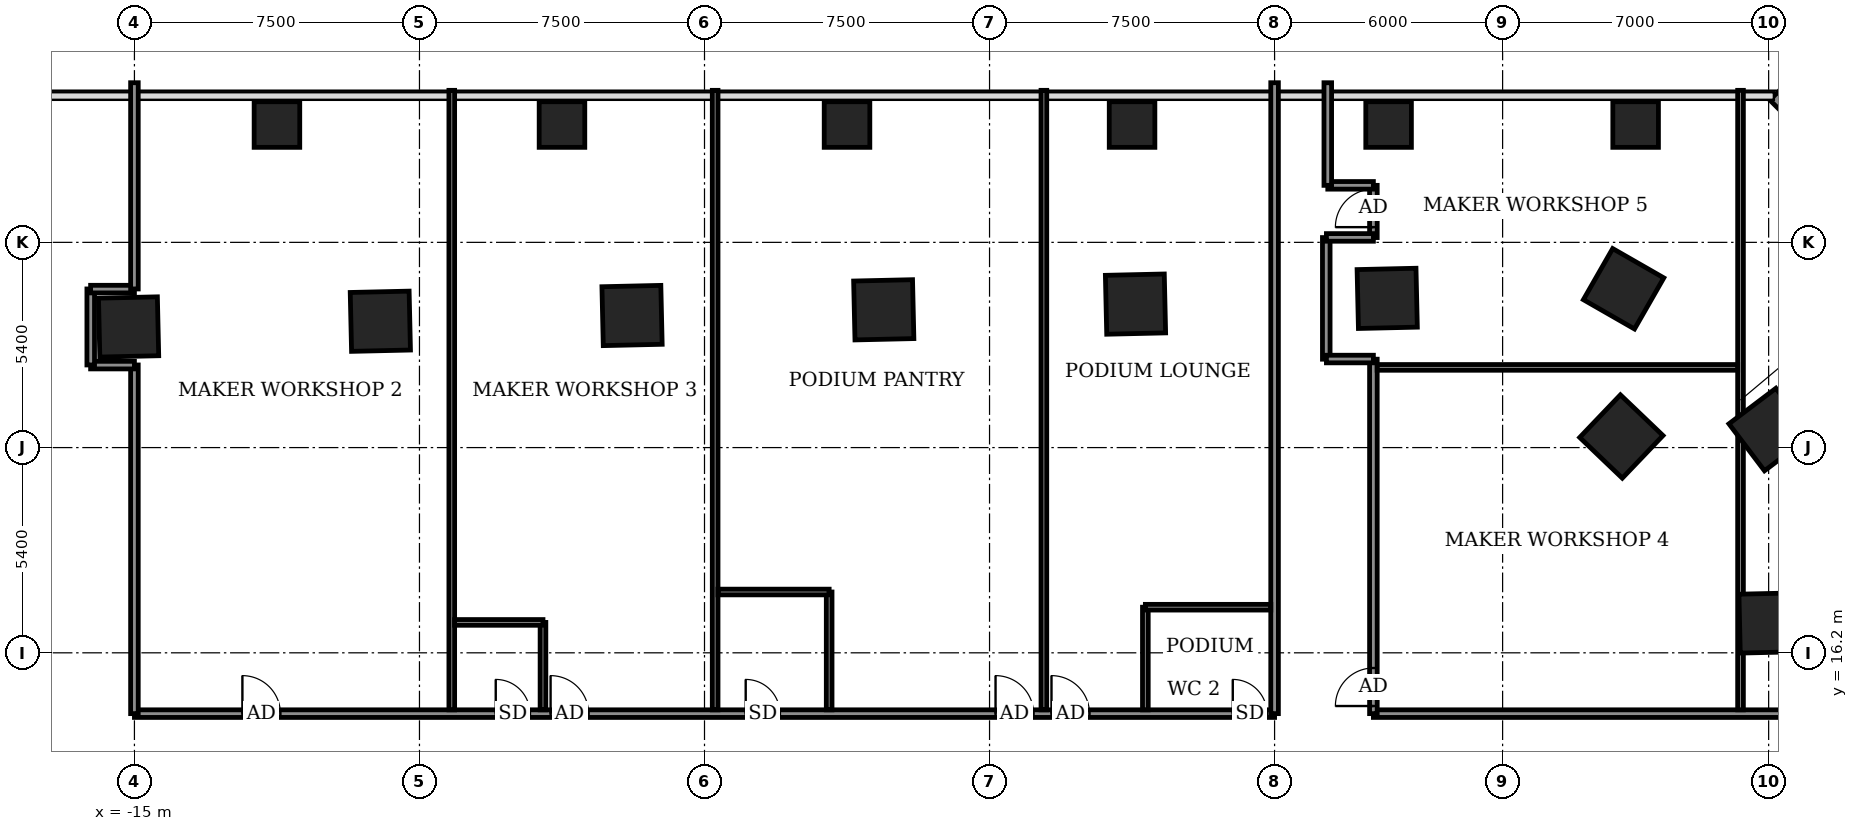
"""IFC4 building model, lengths in metres.
Left out: names, types, materials, properties, quantities, classifications, styles, units other than length and angle.
Written with IfcOpenShell. Run it as: python <this file> out.ifc"""

import sys

from ifc_helpers import new_model, si_unit, direction, frame, frame_2d, origin, origin_2d, place, context, subcontext, project, spatial, rectangle, extrude, element, fill, save


model = new_model("IFC4")
c1 = context("Model", 3, precision=1e-05, world=origin(), true_north=direction((0.0, 1.0)))
c2 = subcontext(c1, "Body", "Model", "MODEL_VIEW")
j1 = project(units=[si_unit("LENGTHUNIT", "METRE"), si_unit("PLANEANGLEUNIT", "RADIAN")], contexts=[c1])
p1 = place(None, origin())
s1 = spatial("IfcSite", under=j1, at=p1, CompositionType="ELEMENT")
p2 = place(p1, origin())
s2 = spatial("IfcBuilding", under=s1, at=p2, CompositionType="ELEMENT")
p3 = place(p2, frame((0.0, 0.0, 20.5)))
s3 = spatial("IfcBuildingStorey", under=s2, at=p3, CompositionType="ELEMENT", Elevation=20.5)
for number, where, z_axis, x_axis in (
    (1, (28.01, 16.985, -0.55), (0.0, 0.0, 1.0), (-0.023, 1.0, 0.0)),
    (2, (28.041, 22.075, -0.55), (0.0, 0.0, 1.0), (-0.604, 0.797, 0.0)),
    (3, (24.125, 21.892, -0.55), (0.0, 0.0, 1.0), (-0.723, 0.691, 0.0)),
    (4, (24.184, 25.779, -0.55), (0.0, 0.0, 1.0), (-0.868, 0.497, 0.0)),
    (5, (17.964, 25.526, -0.55), (0.0, 0.0, 1.0), (-1.0, -0.023, 0.0)),
    (6, (11.341, 25.375, -0.55), (0.0, 0.0, 1.0), (-1.0, -0.023, 0.0)),
    (7, (4.717, 25.225, -0.55), (0.0, 0.0, 1.0), (-1.0, -0.023, 0.0)),
    (8, (-1.906, 25.075, -0.55), (0.0, 0.0, 1.0), (-1.0, -0.023, 0.0)),
    (9, (-8.529, 24.924, -0.55), (0.0, 0.0, 1.0), (-1.0, -0.023, 0.0)),
    (10, (-15.154, 24.774, -0.55), (0.0, 0.0, 1.0), (-1.0, -0.023, 0.0)),
):
    element("IfcColumn", number, at=place(p3, frame(where, z_axis=z_axis, x_axis=x_axis)), inside=s3, PredefinedType="COLUMN", context=c2, shape_type="SweptSolid", body=[
        extrude(rectangle(XDim=1.55, YDim=1.55, at=origin_2d()), origin(), (0.0, 0.0, 1.0), 4.5),
    ])
for number, where, z_axis, x_axis in (
    (11, (-11.25, 30.1, -0.55), (0.0, 0.0, 1.0), (1.0, 0.0, 0.0)),
    (12, (-3.75, 30.1, -0.55), (0.0, 0.0, 1.0), (1.0, 0.0, 0.0)),
    (13, (3.75, 30.1, -0.55), (0.0, 0.0, 1.0), (1.0, 0.0, 0.0)),
    (14, (11.25, 30.1, -0.55), (0.0, 0.0, 1.0), (1.0, 0.0, 0.0)),
    (15, (18.0, 30.1, -0.55), (0.0, 0.0, 1.0), (1.0, 0.0, 0.0)),
    (16, (24.5, 30.1, -0.55), (0.0, 0.0, 1.0), (1.0, 0.0, 0.0)),
):
    element("IfcColumn", number, at=place(p3, frame(where, z_axis=z_axis, x_axis=x_axis)), inside=s3, PredefinedType="COLUMN", context=c2, shape_type="SweptSolid", body=[
        extrude(rectangle(XDim=1.2, YDim=1.2, at=origin_2d()), origin(), (0.0, 0.0, 1.0), 4.5),
    ])
p4 = place(p3, frame((36.05, 22.938, 0.0), z_axis=(0.0, 0.0, 1.0), x_axis=(-0.707106781187, 0.707106781187, 0.0)))
e17 = element("IfcWall", 17, at=p4, inside=s3, PredefinedType="SOLIDWALL", context=c2, shape_type="SweptSolid", body=[
    extrude(rectangle(XDim=11.189, YDim=0.3, at=frame_2d((5.595, 0.0))), origin(), (0.0, 0.0, 1.0), 3.95),
])
p5 = place(p4, frame((1.242, 0.0, 0.9)))
e18 = element("IfcOpeningElement", 18, at=p5, cuts=e17, PredefinedType="OPENING", context=c2, shape_type="SweptSolid", body=[
    extrude(rectangle(XDim=2.4, YDim=1.8, at=frame_2d((1.2, 0.9))), frame((0.0, 0.16, 0.0), z_axis=(0.0, -1.0, 0.0), x_axis=(1.0, 0.0, 0.0)), (0.0, 0.0, 1.0), 0.32),
])
p6 = place(p3, frame((-15.0, 14.6, 0.0), z_axis=(0.0, 0.0, 1.0), x_axis=(1.0, 0.0, 0.0)))
e19 = element("IfcWall", 19, at=p6, inside=s3, PredefinedType="PARTITIONING", context=c2, shape_type="SweptSolid", body=[
    extrude(rectangle(XDim=30.0, YDim=0.2, at=frame_2d((15.0, 0.0))), origin(), (0.0, 0.0, 1.0), 3.95),
])
p7 = place(p6, frame((2.841, 0.0, 0.0)))
e20 = element("IfcOpeningElement", 20, at=p7, cuts=e19, PredefinedType="OPENING", context=c2, shape_type="SweptSolid", body=[
    extrude(rectangle(XDim=1.0, YDim=2.1, at=frame_2d((0.5, 1.05))), frame((0.0, 0.11, 0.0), z_axis=(0.0, -1.0, 0.0), x_axis=(1.0, 0.0, 0.0)), (0.0, 0.0, 1.0), 0.22),
])
p8 = place(p6, frame((10.95, 0.0, 0.0)))
e21 = element("IfcOpeningElement", 21, at=p8, cuts=e19, PredefinedType="OPENING", context=c2, shape_type="SweptSolid", body=[
    extrude(rectangle(XDim=1.0, YDim=2.1, at=frame_2d((0.5, 1.05))), frame((0.0, 0.11, 0.0), z_axis=(0.0, -1.0, 0.0), x_axis=(1.0, 0.0, 0.0)), (0.0, 0.0, 1.0), 0.22),
])
p9 = place(p6, frame((9.507, 0.0, 0.0)))
e22 = element("IfcOpeningElement", 22, at=p9, cuts=e19, PredefinedType="OPENING", context=c2, shape_type="SweptSolid", body=[
    extrude(rectangle(XDim=0.9, YDim=2.1, at=frame_2d((0.45, 1.05))), frame((0.0, 0.11, 0.0), z_axis=(0.0, -1.0, 0.0), x_axis=(1.0, 0.0, 0.0)), (0.0, 0.0, 1.0), 0.22),
])
p10 = place(p6, frame((22.658, 0.0, 0.0)))
e23 = element("IfcOpeningElement", 23, at=p10, cuts=e19, PredefinedType="OPENING", context=c2, shape_type="SweptSolid", body=[
    extrude(rectangle(XDim=1.0, YDim=2.1, at=frame_2d((0.5, 1.05))), frame((0.0, 0.11, 0.0), z_axis=(0.0, -1.0, 0.0), x_axis=(1.0, 0.0, 0.0)), (0.0, 0.0, 1.0), 0.22),
])
p11 = place(p6, frame((16.084, 0.0, 0.0)))
e24 = element("IfcOpeningElement", 24, at=p11, cuts=e19, PredefinedType="OPENING", context=c2, shape_type="SweptSolid", body=[
    extrude(rectangle(XDim=0.9, YDim=2.1, at=frame_2d((0.45, 1.05))), frame((0.0, 0.11, 0.0), z_axis=(0.0, -1.0, 0.0), x_axis=(1.0, 0.0, 0.0)), (0.0, 0.0, 1.0), 0.22),
])
p12 = place(p6, frame((24.13, 0.0, 0.0)))
e25 = element("IfcOpeningElement", 25, at=p12, cuts=e19, PredefinedType="OPENING", context=c2, shape_type="SweptSolid", body=[
    extrude(rectangle(XDim=1.0, YDim=2.1, at=frame_2d((0.5, 1.05))), frame((0.0, 0.11, 0.0), z_axis=(0.0, -1.0, 0.0), x_axis=(1.0, 0.0, 0.0)), (0.0, 0.0, 1.0), 0.22),
])
p13 = place(p6, frame((28.9, 0.0, 0.0)))
e26 = element("IfcOpeningElement", 26, at=p13, cuts=e19, PredefinedType="OPENING", context=c2, shape_type="SweptSolid", body=[
    extrude(rectangle(XDim=0.9, YDim=2.1, at=frame_2d((0.45, 1.05))), frame((0.0, 0.11, 0.0), z_axis=(0.0, -1.0, 0.0), x_axis=(1.0, 0.0, 0.0)), (0.0, 0.0, 1.0), 0.22),
])
p14 = place(p3, frame((-15.0, 14.6, 0.0), z_axis=(0.0, 0.0, 1.0), x_axis=(0.0, 1.0, 0.0)))
e27 = element("IfcWall", 27, at=p14, inside=s3, PredefinedType="PARTITIONING", context=c2, shape_type="SweptSolid", body=[
    extrude(rectangle(XDim=9.174, YDim=0.2, at=frame_2d((4.587, 0.0))), origin(), (0.0, 0.0, 1.0), 3.95),
])
p15 = place(p3, frame((-6.65, 14.7, 0.0), z_axis=(0.0, 0.0, 1.0), x_axis=(0.0, 1.0, 0.0)))
e28 = element("IfcWall", 28, at=p15, inside=s3, PredefinedType="PARTITIONING", context=c2, shape_type="SweptSolid", body=[
    extrude(rectangle(XDim=16.3, YDim=0.15, at=frame_2d((8.15, 0.0))), origin(), (0.0, 0.0, 1.0), 0.94),
])
p16 = place(p3, frame((-4.25, 14.7, 0.0), z_axis=(0.0, 0.0, 1.0), x_axis=(0.0, 1.0, 0.0)))
e29 = element("IfcWall", 29, at=p16, inside=s3, PredefinedType="PARTITIONING", context=c2, shape_type="SweptSolid", body=[
    extrude(rectangle(XDim=2.3, YDim=0.15, at=frame_2d((1.15, 0.0))), origin(), (0.0, 0.0, 1.0), 3.95),
])
p17 = place(p3, frame((0.28, 14.7, 0.0), z_axis=(0.0, 0.0, 1.0), x_axis=(0.0, 1.0, 0.0)))
e30 = element("IfcWall", 30, at=p17, inside=s3, PredefinedType="PARTITIONING", context=c2, shape_type="SweptSolid", body=[
    extrude(rectangle(XDim=16.3, YDim=0.15, at=frame_2d((8.15, 0.0))), origin(), (0.0, 0.0, 1.0), 0.94),
])
p18 = place(p3, frame((3.28, 14.7, 0.0), z_axis=(0.0, 0.0, 1.0), x_axis=(0.0, 1.0, 0.0)))
e31 = element("IfcWall", 31, at=p18, inside=s3, PredefinedType="PARTITIONING", context=c2, shape_type="SweptSolid", body=[
    extrude(rectangle(XDim=3.1, YDim=0.15, at=frame_2d((1.55, 0.0))), origin(), (0.0, 0.0, 1.0), 3.95),
])
p19 = place(p3, frame((8.93, 14.7, 0.0), z_axis=(0.0, 0.0, 1.0), x_axis=(0.0, 1.0, 0.0)))
e32 = element("IfcWall", 32, at=p19, inside=s3, PredefinedType="PARTITIONING", context=c2, shape_type="SweptSolid", body=[
    extrude(rectangle(XDim=16.3, YDim=0.15, at=frame_2d((8.15, 0.0))), origin(), (0.0, 0.0, 1.0), 0.94),
])
p20 = place(p3, frame((11.6, 14.7, 0.0), z_axis=(0.0, 0.0, 1.0), x_axis=(0.0, 1.0, 0.0)))
e33 = element("IfcWall", 33, at=p20, inside=s3, PredefinedType="PARTITIONING", context=c2, shape_type="SweptSolid", body=[
    extrude(rectangle(XDim=2.7, YDim=0.15, at=frame_2d((1.35, 0.0))), origin(), (0.0, 0.0, 1.0), 3.95),
])
p21 = place(p3, frame((15.0, 14.6, 0.0), z_axis=(0.0, 0.0, 1.0), x_axis=(0.0, 1.0, 0.0)))
e34 = element("IfcWall", 34, at=p21, inside=s3, PredefinedType="PARTITIONING", context=c2, shape_type="SweptSolid", body=[
    extrude(rectangle(XDim=16.6, YDim=0.2, at=frame_2d((8.3, 0.0))), origin(), (0.0, 0.0, 1.0), 0.94),
])
p22 = place(p3, frame((17.6, 14.6, 0.0), z_axis=(0.0, 0.0, 1.0), x_axis=(1.0, 0.0, 0.0)))
e35 = element("IfcWall", 35, at=p22, inside=s3, PredefinedType="PARTITIONING", context=c2, shape_type="SweptSolid", body=[
    extrude(rectangle(XDim=16.7, YDim=0.2, at=frame_2d((8.35, 0.0))), origin(), (0.0, 0.0, 1.0), 3.95),
])
p23 = place(p22, frame((13.194, 0.0, 0.0)))
e36 = element("IfcOpeningElement", 36, at=p23, cuts=e35, PredefinedType="OPENING", context=c2, shape_type="SweptSolid", body=[
    extrude(rectangle(XDim=1.0, YDim=2.1, at=frame_2d((0.5, 1.05))), frame((0.0, 0.11, 0.0), z_axis=(0.0, -1.0, 0.0), x_axis=(1.0, 0.0, 0.0)), (0.0, 0.0, 1.0), 0.22),
])
p24 = place(p3, frame((17.6, 14.6, 0.0), z_axis=(0.0, 0.0, 1.0), x_axis=(0.0, 1.0, 0.0)))
e37 = element("IfcWall", 37, at=p24, inside=s3, PredefinedType="PARTITIONING", context=c2, shape_type="SweptSolid", body=[
    extrude(rectangle(XDim=9.326, YDim=0.2, at=frame_2d((4.663, 0.0))), origin(), (0.0, 0.0, 1.0), 3.95),
])
p25 = place(p24, frame((0.2, 0.0, 0.0)))
e38 = element("IfcOpeningElement", 38, at=p25, cuts=e37, PredefinedType="OPENING", context=c2, shape_type="SweptSolid", body=[
    extrude(rectangle(XDim=1.0, YDim=2.1, at=frame_2d((0.5, 1.05))), frame((0.0, 0.11, 0.0), z_axis=(0.0, -1.0, 0.0), x_axis=(1.0, 0.0, 0.0)), (0.0, 0.0, 1.0), 0.22),
])
p26 = place(p3, frame((27.26, 14.7, 0.0), z_axis=(0.0, 0.0, 1.0), x_axis=(0.0, 1.0, 0.0)))
e39 = element("IfcWall", 39, at=p26, inside=s3, PredefinedType="PARTITIONING", context=c2, shape_type="SweptSolid", body=[
    extrude(rectangle(XDim=16.3, YDim=0.15, at=frame_2d((8.15, 0.0))), origin(), (0.0, 0.0, 1.0), 0.94),
])
p27 = place(p3, frame((-6.575, 17.0, 0.0), z_axis=(0.0, 0.0, 1.0), x_axis=(1.0, 0.0, 0.0)))
e40 = element("IfcWall", 40, at=p27, inside=s3, PredefinedType="PARTITIONING", context=c2, shape_type="SweptSolid", body=[
    extrude(rectangle(XDim=2.325, YDim=0.15, at=frame_2d((1.163, 0.0))), origin(), (0.0, 0.0, 1.0), 3.95),
])
p28 = place(p3, frame((11.6, 17.4, 0.0), z_axis=(0.0, 0.0, 1.0), x_axis=(1.0, 0.0, 0.0)))
e41 = element("IfcWall", 41, at=p28, inside=s3, PredefinedType="PARTITIONING", context=c2, shape_type="SweptSolid", body=[
    extrude(rectangle(XDim=3.3, YDim=0.15, at=frame_2d((1.65, 0.0))), origin(), (0.0, 0.0, 1.0), 3.95),
])
p29 = place(p3, frame((0.355, 17.8, 0.0), z_axis=(0.0, 0.0, 1.0), x_axis=(1.0, 0.0, 0.0)))
e42 = element("IfcWall", 42, at=p29, inside=s3, PredefinedType="PARTITIONING", context=c2, shape_type="SweptSolid", body=[
    extrude(rectangle(XDim=2.925, YDim=0.15, at=frame_2d((1.462, 0.0))), origin(), (0.0, 0.0, 1.0), 3.95),
])
p30 = place(p3, frame((17.7, 23.71, 0.0), z_axis=(0.0, 0.0, 1.0), x_axis=(1.0, 0.0, 0.0)))
e43 = element("IfcWall", 43, at=p30, inside=s3, PredefinedType="PARTITIONING", context=c2, shape_type="SweptSolid", body=[
    extrude(rectangle(XDim=9.485, YDim=0.15, at=frame_2d((4.743, 0.0))), origin(), (0.0, 0.0, 1.0), 3.95),
])
p31 = place(p3, frame((-16.153, 23.77, 0.0), z_axis=(0.0, 0.0, 1.0), x_axis=(1.0, 0.0, 0.0)))
e44 = element("IfcWall", 44, at=p31, inside=s3, PredefinedType="PARTITIONING", context=c2, shape_type="SweptSolid", body=[
    extrude(rectangle(XDim=1.153, YDim=0.2, at=frame_2d((0.577, 0.0))), origin(), (0.0, 0.0, 1.0), 3.95),
])
p32 = place(p3, frame((-16.15, 23.774, 0.0), z_axis=(0.0, 0.0, 1.0), x_axis=(0.0, 1.0, 0.0)))
e45 = element("IfcWall", 45, at=p32, inside=s3, PredefinedType="PARTITIONING", context=c2, shape_type="SweptSolid", body=[
    extrude(rectangle(XDim=2.0, YDim=0.2, at=frame_2d((1.0, 0.0))), origin(), (0.0, 0.0, 1.0), 3.95),
])
p33 = place(p3, frame((16.36, 23.926, 0.0), z_axis=(0.0, 0.0, 1.0), x_axis=(0.0, 1.0, 0.0)))
e46 = element("IfcWall", 46, at=p33, inside=s3, PredefinedType="PARTITIONING", context=c2, shape_type="SweptSolid", body=[
    extrude(rectangle(XDim=3.2, YDim=0.2, at=frame_2d((1.6, 0.0))), origin(), (0.0, 0.0, 1.0), 3.95),
])
p34 = place(p3, frame((16.364, 23.93, 0.0), z_axis=(0.0, 0.0, 1.0), x_axis=(1.0, 0.0, 0.0)))
e47 = element("IfcWall", 47, at=p34, inside=s3, PredefinedType="PARTITIONING", context=c2, shape_type="SweptSolid", body=[
    extrude(rectangle(XDim=1.236, YDim=0.2, at=frame_2d((0.618, 0.0))), origin(), (0.0, 0.0, 1.0), 3.95),
])
p35 = place(p3, frame((-16.153, 25.77, 0.0), z_axis=(0.0, 0.0, 1.0), x_axis=(1.0, 0.0, 0.0)))
e48 = element("IfcWall", 48, at=p35, inside=s3, PredefinedType="PARTITIONING", context=c2, shape_type="SweptSolid", body=[
    extrude(rectangle(XDim=1.153, YDim=0.2, at=frame_2d((0.577, 0.0))), origin(), (0.0, 0.0, 1.0), 3.95),
])
p36 = place(p3, frame((-15.0, 25.774, 0.0), z_axis=(0.0, 0.0, 1.0), x_axis=(0.0, 1.0, 0.0)))
e49 = element("IfcWall", 49, at=p36, inside=s3, PredefinedType="PARTITIONING", context=c2, shape_type="SweptSolid", body=[
    extrude(rectangle(XDim=5.426, YDim=0.2, at=frame_2d((2.713, 0.0))), origin(), (0.0, 0.0, 1.0), 0.94),
])
p37 = place(p3, frame((17.6, 27.126, 0.0), z_axis=(0.0, 0.0, 1.0), x_axis=(0.0, 1.0, 0.0)))
e50 = element("IfcWall", 50, at=p37, inside=s3, PredefinedType="PARTITIONING", context=c2, shape_type="SweptSolid", body=[
    extrude(rectangle(XDim=1.374, YDim=0.2, at=frame_2d((0.687, 0.0))), origin(), (0.0, 0.0, 1.0), 3.95),
])
p38 = place(p37, frame((0.274, 0.0, 0.0)))
e51 = element("IfcOpeningElement", 51, at=p38, cuts=e50, PredefinedType="OPENING", context=c2, shape_type="SweptSolid", body=[
    extrude(rectangle(XDim=1.0, YDim=2.1, at=frame_2d((0.5, 1.05))), frame((0.0, 0.11, 0.0), z_axis=(0.0, -1.0, 0.0), x_axis=(1.0, 0.0, 0.0)), (0.0, 0.0, 1.0), 0.22),
])
p39 = place(p3, frame((16.364, 27.13, 0.0), z_axis=(0.0, 0.0, 1.0), x_axis=(1.0, 0.0, 0.0)))
e52 = element("IfcWall", 52, at=p39, inside=s3, PredefinedType="PARTITIONING", context=c2, shape_type="SweptSolid", body=[
    extrude(rectangle(XDim=1.236, YDim=0.2, at=frame_2d((0.618, 0.0))), origin(), (0.0, 0.0, 1.0), 3.95),
])
p40 = place(p3, frame((16.4, 28.5, 0.0), z_axis=(0.0, 0.0, 1.0), x_axis=(1.0, 0.0, 0.0)))
e53 = element("IfcWall", 53, at=p40, inside=s3, PredefinedType="PARTITIONING", context=c2, shape_type="SweptSolid", body=[
    extrude(rectangle(XDim=1.2, YDim=0.2, at=frame_2d((0.6, 0.0))), origin(), (0.0, 0.0, 1.0), 3.95),
])
p41 = place(p3, frame((16.4, 28.5, 0.0), z_axis=(0.0, 0.0, 1.0), x_axis=(0.0, 1.0, 0.0)))
e54 = element("IfcWall", 54, at=p41, inside=s3, PredefinedType="PARTITIONING", context=c2, shape_type="SweptSolid", body=[
    extrude(rectangle(XDim=2.7, YDim=0.2, at=frame_2d((1.35, 0.0))), origin(), (0.0, 0.0, 1.0), 0.94),
])
p42 = place(p7, origin())
e55 = element("IfcDoor", 55, at=p42, inside=s3, OperationType="SINGLE_SWING_RIGHT", PredefinedType="DOOR", context=c2, shape_type="SweptSolid", body=[
    extrude(rectangle(XDim=1.0, YDim=2.1, at=frame_2d((0.5, 1.05))), frame((0.0, 0.025, 0.0), z_axis=(0.0, -1.0, 0.0), x_axis=(1.0, 0.0, 0.0)), (0.0, 0.0, 1.0), 0.05),
])
fill(e20, e55)
p43 = place(p8, origin())
e56 = element("IfcDoor", 56, at=p43, inside=s3, OperationType="SINGLE_SWING_LEFT", PredefinedType="DOOR", context=c2, shape_type="SweptSolid", body=[
    extrude(rectangle(XDim=1.0, YDim=2.1, at=frame_2d((0.5, 1.05))), frame((0.0, 0.025, 0.0), z_axis=(0.0, -1.0, 0.0), x_axis=(1.0, 0.0, 0.0)), (0.0, 0.0, 1.0), 0.05),
])
fill(e21, e56)
p44 = place(p9, origin())
e57 = element("IfcDoor", 57, at=p44, inside=s3, OperationType="SINGLE_SWING_RIGHT", PredefinedType="DOOR", context=c2, shape_type="SweptSolid", body=[
    extrude(rectangle(XDim=0.9, YDim=2.1, at=frame_2d((0.45, 1.05))), frame((0.0, 0.025, 0.0), z_axis=(0.0, -1.0, 0.0), x_axis=(1.0, 0.0, 0.0)), (0.0, 0.0, 1.0), 0.05),
])
fill(e22, e57)
p45 = place(p10, origin())
e58 = element("IfcDoor", 58, at=p45, inside=s3, OperationType="SINGLE_SWING_RIGHT", PredefinedType="DOOR", context=c2, shape_type="SweptSolid", body=[
    extrude(rectangle(XDim=1.0, YDim=2.1, at=frame_2d((0.5, 1.05))), frame((0.0, 0.025, 0.0), z_axis=(0.0, -1.0, 0.0), x_axis=(1.0, 0.0, 0.0)), (0.0, 0.0, 1.0), 0.05),
])
fill(e23, e58)
p46 = place(p11, origin())
e59 = element("IfcDoor", 59, at=p46, inside=s3, OperationType="SINGLE_SWING_LEFT", PredefinedType="DOOR", context=c2, shape_type="SweptSolid", body=[
    extrude(rectangle(XDim=0.9, YDim=2.1, at=frame_2d((0.45, 1.05))), frame((0.0, 0.025, 0.0), z_axis=(0.0, -1.0, 0.0), x_axis=(1.0, 0.0, 0.0)), (0.0, 0.0, 1.0), 0.05),
])
fill(e24, e59)
p47 = place(p12, origin())
e60 = element("IfcDoor", 60, at=p47, inside=s3, OperationType="SINGLE_SWING_LEFT", PredefinedType="DOOR", context=c2, shape_type="SweptSolid", body=[
    extrude(rectangle(XDim=1.0, YDim=2.1, at=frame_2d((0.5, 1.05))), frame((0.0, 0.025, 0.0), z_axis=(0.0, -1.0, 0.0), x_axis=(1.0, 0.0, 0.0)), (0.0, 0.0, 1.0), 0.05),
])
fill(e25, e60)
p48 = place(p13, origin())
e61 = element("IfcDoor", 61, at=p48, inside=s3, OperationType="SINGLE_SWING_RIGHT", PredefinedType="DOOR", context=c2, shape_type="SweptSolid", body=[
    extrude(rectangle(XDim=0.9, YDim=2.1, at=frame_2d((0.45, 1.05))), frame((0.0, 0.025, 0.0), z_axis=(0.0, -1.0, 0.0), x_axis=(1.0, 0.0, 0.0)), (0.0, 0.0, 1.0), 0.05),
])
fill(e26, e61)
p49 = place(p25, origin())
e62 = element("IfcDoor", 62, at=p49, inside=s3, OperationType="SINGLE_SWING_RIGHT", PredefinedType="DOOR", context=c2, shape_type="SweptSolid", body=[
    extrude(rectangle(XDim=1.0, YDim=2.1, at=frame_2d((0.5, 1.05))), frame((0.0, 0.025, 0.0), z_axis=(0.0, -1.0, 0.0), x_axis=(1.0, 0.0, 0.0)), (0.0, 0.0, 1.0), 0.05),
])
fill(e38, e62)
p50 = place(p38, origin())
e63 = element("IfcDoor", 63, at=p50, inside=s3, OperationType="SINGLE_SWING_LEFT", PredefinedType="DOOR", context=c2, shape_type="SweptSolid", body=[
    extrude(rectangle(XDim=1.0, YDim=2.1, at=frame_2d((0.5, 1.05))), frame((0.0, 0.025, 0.0), z_axis=(0.0, -1.0, 0.0), x_axis=(1.0, 0.0, 0.0)), (0.0, 0.0, 1.0), 0.05),
])
fill(e51, e63)
save(model, sys.argv[1])
